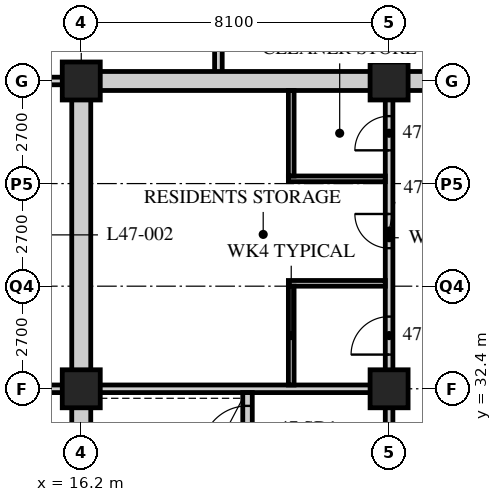
"""IFC4 building model, lengths in metres.
Left out: names, types, materials, properties, quantities, classifications, styles, units other than length and angle.
Written with IfcOpenShell. Run it as: python <this file> out.ifc"""

import sys

from ifc_helpers import new_model, si_unit, direction, frame, frame_2d, origin, origin_2d, place, context, subcontext, project, spatial, rectangle, hollow_rectangle, extrude, element, fill, save


model = new_model("IFC4")
c1 = context("Model", 3, precision=1e-05, world=origin(), true_north=direction((0.0, 1.0)))
c2 = subcontext(c1, "Body", "Model", "MODEL_VIEW")
j1 = project(units=[si_unit("LENGTHUNIT", "METRE"), si_unit("PLANEANGLEUNIT", "RADIAN")], contexts=[c1])
p1 = place(None, origin())
s1 = spatial("IfcSite", under=j1, at=p1, CompositionType="ELEMENT")
p2 = place(p1, origin())
s2 = spatial("IfcBuilding", under=s1, at=p2, CompositionType="ELEMENT")
p3 = place(p2, frame((0.0, 0.0, 184.8)))
s3 = spatial("IfcBuildingStorey", under=s2, at=p3, CompositionType="ELEMENT", Elevation=184.8)
for number, where, z_axis, x_axis in (
    (1, (16.2, 32.4, 0.0), (0.0, 0.0, 1.0), (1.0, 0.0, 0.0)),
    (2, (16.2, 40.5, 0.0), (0.0, 0.0, 1.0), (1.0, 0.0, 0.0)),
    (3, (24.3, 32.4, 0.0), (0.0, 0.0, 1.0), (1.0, 0.0, 0.0)),
    (4, (24.3, 40.5, 0.0), (0.0, 0.0, 1.0), (1.0, 0.0, 0.0)),
):
    element("IfcColumn", number, at=place(p3, frame(where, z_axis=z_axis, x_axis=x_axis)), inside=s3, PredefinedType="COLUMN", context=c2, shape_type="SweptSolid", body=[
        extrude(hollow_rectangle(XDim=1.0, YDim=1.0, WallThickness=0.1, at=origin_2d()), origin(), (0.0, 0.0, 1.0), 3.6),
    ])
p4 = place(p3, frame((13.95, 32.4, 0.0), z_axis=(0.0, 0.0, 1.0), x_axis=(1.0, 0.0, 0.0)))
e5 = element("IfcWall", 5, at=p4, inside=s3, PredefinedType="SOLIDWALL", context=c2, shape_type="SweptSolid", body=[
    extrude(rectangle(XDim=2.25, YDim=0.2, at=frame_2d((1.125, 0.0))), origin(), (0.0, 0.0, 1.0), 3.39),
])
p5 = place(p3, frame((19.809, 45.45, 0.0), z_axis=(0.0, 0.0, 1.0), x_axis=(0.0, -1.0, 0.0)))
e6 = element("IfcWall", 6, at=p5, inside=s3, PredefinedType="SOLIDWALL", context=c2, shape_type="SweptSolid", body=[
    extrude(rectangle(XDim=4.95, YDim=0.2, at=frame_2d((2.475, 0.0))), origin(), (0.0, 0.0, 1.0), 3.39),
])
p6 = place(p3, frame((13.95, 40.5, 0.0), z_axis=(0.0, 0.0, 1.0), x_axis=(1.0, 0.0, 0.0)))
e7 = element("IfcWall", 7, at=p6, inside=s3, PredefinedType="SOLIDWALL", context=c2, shape_type="SweptSolid", body=[
    extrude(rectangle(XDim=2.25, YDim=0.2, at=frame_2d((1.125, 0.0))), origin(), (0.0, 0.0, 1.0), 3.39),
])
p7 = place(p3, frame((15.95, 40.5, 0.0), z_axis=(0.0, 0.0, 1.0), x_axis=(1.0, 0.0, 0.0)))
e8 = element("IfcWall", 8, at=p7, inside=s3, PredefinedType="SOLIDWALL", context=c2, shape_type="SweptSolid", body=[
    extrude(rectangle(XDim=24.8, YDim=0.5, at=frame_2d((12.4, 0.0))), origin(), (0.0, 0.0, 1.0), 2.74),
])
p8 = place(p7, frame((11.5, 0.0, 0.0)))
e9 = element("IfcOpeningElement", 9, at=p8, cuts=e8, PredefinedType="OPENING", context=c2, shape_type="SweptSolid", body=[
    extrude(rectangle(XDim=1.8, YDim=2.4, at=frame_2d((0.9, 1.2))), frame((0.0, 0.26, 0.0), z_axis=(0.0, -1.0, 0.0), x_axis=(1.0, 0.0, 0.0)), (0.0, 0.0, 1.0), 0.52),
])
p9 = place(p3, frame((16.2, 24.55, 0.0), z_axis=(0.0, 0.0, 1.0), x_axis=(0.0, 1.0, 0.0)))
e10 = element("IfcWall", 10, at=p9, inside=s3, PredefinedType="SOLIDWALL", context=c2, shape_type="SweptSolid", body=[
    extrude(rectangle(XDim=15.7, YDim=0.5, at=frame_2d((7.85, 0.0))), origin(), (0.0, 0.0, 1.0), 2.778),
])
p10 = place(p3, frame((16.45, 32.4, 0.0), z_axis=(0.0, 0.0, 1.0), x_axis=(1.0, 0.0, 0.0)))
e11 = element("IfcWall", 11, at=p10, inside=s3, PredefinedType="SOLIDWALL", context=c2, shape_type="SweptSolid", body=[
    extrude(rectangle(XDim=7.95, YDim=0.2, at=frame_2d((3.975, 0.0))), origin(), (0.0, 0.0, 1.0), 2.778),
])
p11 = place(p3, frame((24.3, 24.55, 0.0), z_axis=(0.0, 0.0, 1.0), x_axis=(0.0, 1.0, 0.0)))
e12 = element("IfcWall", 12, at=p11, inside=s3, PredefinedType="SOLIDWALL", context=c2, shape_type="SweptSolid", body=[
    extrude(rectangle(XDim=7.75, YDim=0.2, at=frame_2d((3.875, 0.0))), origin(), (0.0, 0.0, 1.0), 2.778),
])
p12 = place(p11, frame((4.6, 0.0, 0.0)))
e13 = element("IfcOpeningElement", 13, at=p12, cuts=e12, PredefinedType="OPENING", context=c2, shape_type="SweptSolid", body=[
    extrude(rectangle(XDim=1.2, YDim=2.1, at=frame_2d((0.6, 1.05))), frame((0.0, 0.11, 0.0), z_axis=(0.0, -1.0, 0.0), x_axis=(1.0, 0.0, 0.0)), (0.0, 0.0, 1.0), 0.22),
])
p13 = place(p3, frame((20.575, 24.55, 0.0), z_axis=(0.0, 0.0, 1.0), x_axis=(0.0, 1.0, 0.0)))
e14 = element("IfcWall", 14, at=p13, inside=s3, PredefinedType="SOLIDWALL", context=c2, shape_type="SweptSolid", body=[
    extrude(rectangle(XDim=7.75, YDim=0.25, at=frame_2d((3.875, 0.0))), origin(), (0.0, 0.0, 1.0), 3.39),
])
p14 = place(p13, frame((6.2, 0.0, 0.0)))
e15 = element("IfcOpeningElement", 15, at=p14, cuts=e14, PredefinedType="OPENING", context=c2, shape_type="SweptSolid", body=[
    extrude(rectangle(XDim=1.2, YDim=2.1, at=frame_2d((0.6, 1.05))), frame((0.0, 0.135, 0.0), z_axis=(0.0, -1.0, 0.0), x_axis=(1.0, 0.0, 0.0)), (0.0, 0.0, 1.0), 0.27),
])
p15 = place(p3, frame((24.3, 32.5, 0.0), z_axis=(0.0, 0.0, 1.0), x_axis=(0.0, 1.0, 0.0)))
e16 = element("IfcWall", 16, at=p15, inside=s3, PredefinedType="PARTITIONING", context=c2, shape_type="SweptSolid", body=[
    extrude(rectangle(XDim=7.75, YDim=0.2, at=frame_2d((3.875, 0.0))), origin(), (0.0, 0.0, 1.0), 2.778),
])
p16 = place(p15, frame((0.8, 0.0, 0.0)))
e17 = element("IfcOpeningElement", 17, at=p16, cuts=e16, PredefinedType="OPENING", context=c2, shape_type="SweptSolid", body=[
    extrude(rectangle(XDim=1.0, YDim=2.1, at=frame_2d((0.5, 1.05))), frame((0.0, 0.11, 0.0), z_axis=(0.0, -1.0, 0.0), x_axis=(1.0, 0.0, 0.0)), (0.0, 0.0, 1.0), 0.22),
])
p17 = place(p15, frame((3.6, 0.0, 0.0)))
e18 = element("IfcOpeningElement", 18, at=p17, cuts=e16, PredefinedType="OPENING", context=c2, shape_type="SweptSolid", body=[
    extrude(rectangle(XDim=0.9, YDim=2.1, at=frame_2d((0.45, 1.05))), frame((0.0, 0.11, 0.0), z_axis=(0.0, -1.0, 0.0), x_axis=(1.0, 0.0, 0.0)), (0.0, 0.0, 1.0), 0.22),
])
p18 = place(p15, frame((6.175, 0.0, 0.0)))
e19 = element("IfcOpeningElement", 19, at=p18, cuts=e16, PredefinedType="OPENING", context=c2, shape_type="SweptSolid", body=[
    extrude(rectangle(XDim=0.9, YDim=2.1, at=frame_2d((0.45, 1.05))), frame((0.0, 0.11, 0.0), z_axis=(0.0, -1.0, 0.0), x_axis=(1.0, 0.0, 0.0)), (0.0, 0.0, 1.0), 0.22),
])
for number, where, z_axis, x_axis in (
    (20, (21.65, 35.175, 0.0), (0.0, 0.0, 1.0), (1.0, 0.0, 0.0)),
    (21, (21.65, 37.925, 0.0), (0.0, 0.0, 1.0), (1.0, 0.0, 0.0)),
):
    element("IfcWall", number, at=place(p3, frame(where, z_axis=z_axis, x_axis=x_axis)), inside=s3, PredefinedType="PARTITIONING", context=c2, shape_type="SweptSolid", body=[
        extrude(rectangle(XDim=2.55, YDim=0.15, at=frame_2d((1.275, 0.0))), origin(), (0.0, 0.0, 1.0), 3.39),
    ])
p19 = place(p3, frame((21.725, 32.5, 0.0), z_axis=(0.0, 0.0, 1.0), x_axis=(0.0, 1.0, 0.0)))
e22 = element("IfcWall", 22, at=p19, inside=s3, PredefinedType="PARTITIONING", context=c2, shape_type="SweptSolid", body=[
    extrude(rectangle(XDim=2.6, YDim=0.15, at=frame_2d((1.3, 0.0))), origin(), (0.0, 0.0, 1.0), 3.39),
])
p20 = place(p3, frame((21.725, 38.0, 0.0), z_axis=(0.0, 0.0, 1.0), x_axis=(0.0, 1.0, 0.0)))
e23 = element("IfcWall", 23, at=p20, inside=s3, PredefinedType="PARTITIONING", context=c2, shape_type="SweptSolid", body=[
    extrude(rectangle(XDim=2.25, YDim=0.15, at=frame_2d((1.125, 0.0))), origin(), (0.0, 0.0, 1.0), 3.39),
])
p21 = place(p16, origin())
e24 = element("IfcDoor", 24, at=p21, inside=s3, OperationType="SINGLE_SWING_LEFT", PredefinedType="DOOR", context=c2, shape_type="SweptSolid", body=[
    extrude(rectangle(XDim=1.0, YDim=2.1, at=frame_2d((0.5, 1.05))), frame((0.0, 0.025, 0.0), z_axis=(0.0, -1.0, 0.0), x_axis=(1.0, 0.0, 0.0)), (0.0, 0.0, 1.0), 0.05),
])
fill(e17, e24)
p22 = place(p17, origin())
e25 = element("IfcDoor", 25, at=p22, inside=s3, OperationType="SINGLE_SWING_RIGHT", PredefinedType="DOOR", context=c2, shape_type="SweptSolid", body=[
    extrude(rectangle(XDim=0.9, YDim=2.1, at=frame_2d((0.45, 1.05))), frame((0.0, 0.025, 0.0), z_axis=(0.0, -1.0, 0.0), x_axis=(1.0, 0.0, 0.0)), (0.0, 0.0, 1.0), 0.05),
])
fill(e18, e25)
p23 = place(p18, origin())
e26 = element("IfcDoor", 26, at=p23, inside=s3, OperationType="SINGLE_SWING_LEFT", PredefinedType="DOOR", context=c2, shape_type="SweptSolid", body=[
    extrude(rectangle(XDim=0.9, YDim=2.1, at=frame_2d((0.45, 1.05))), frame((0.0, 0.025, 0.0), z_axis=(0.0, -1.0, 0.0), x_axis=(1.0, 0.0, 0.0)), (0.0, 0.0, 1.0), 0.05),
])
fill(e19, e26)
p24 = place(p14, origin())
e27 = element("IfcDoor", 27, at=p24, inside=s3, OperationType="SINGLE_SWING_LEFT", PredefinedType="DOOR", context=c2, shape_type="SweptSolid", body=[
    extrude(rectangle(XDim=1.2, YDim=2.1, at=frame_2d((0.6, 1.05))), frame((0.0, 0.025, 0.0), z_axis=(0.0, -1.0, 0.0), x_axis=(1.0, 0.0, 0.0)), (0.0, 0.0, 1.0), 0.05),
])
fill(e15, e27)
save(model, sys.argv[1])
